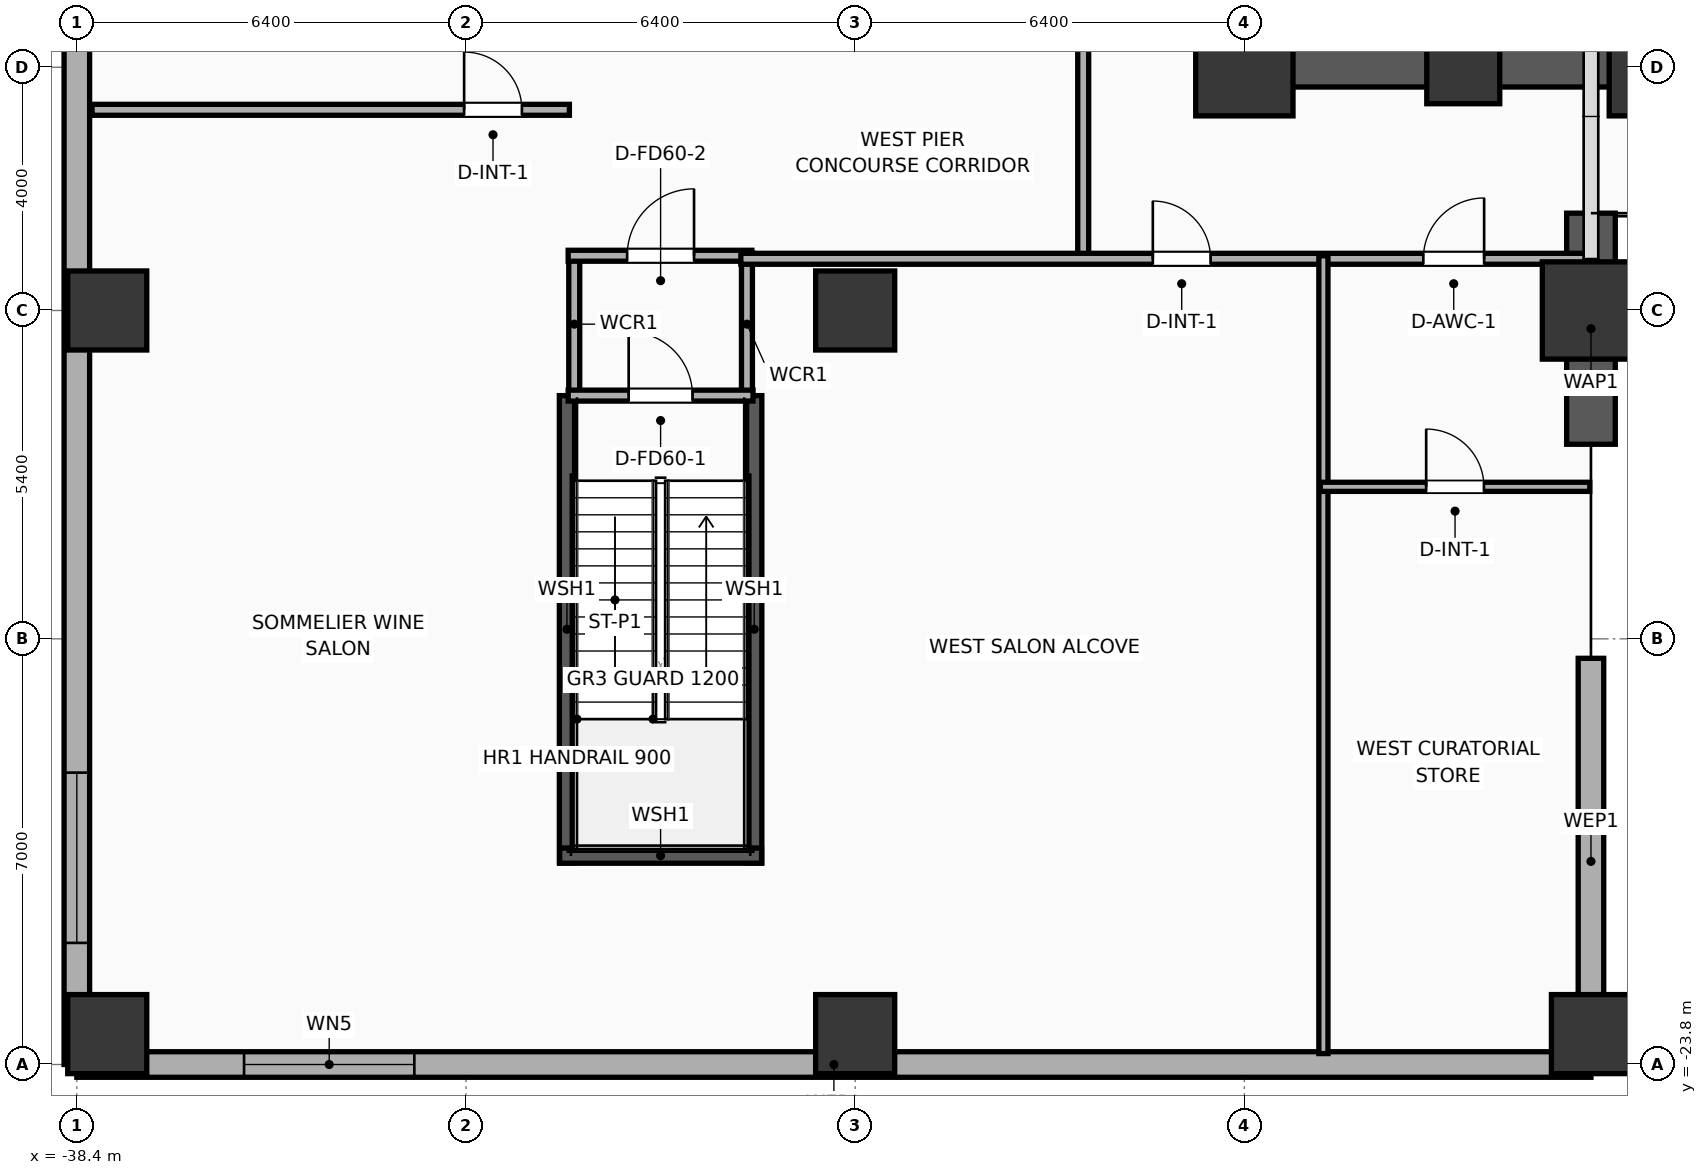
"""IFC4 building model, lengths in metres.
Left out: names, types, materials, properties, quantities, classifications, styles, units other than length and angle.
Written with IfcOpenShell. Run it as: python <this file> out.ifc"""

import sys

from ifc_helpers import new_model, si_unit, direction, frame, frame_2d, origin, origin_2d, place, context, subcontext, project, spatial, rectangle, extrude, element, fill, save


model = new_model("IFC4")
c1 = context("Model", 3, precision=1e-05, world=origin(), true_north=direction((0.0, 1.0)))
c2 = subcontext(c1, "Body", "Model", "MODEL_VIEW")
j1 = project(units=[si_unit("LENGTHUNIT", "METRE"), si_unit("PLANEANGLEUNIT", "RADIAN")], contexts=[c1])
p1 = place(None, origin())
s1 = spatial("IfcSite", under=j1, at=p1, CompositionType="ELEMENT")
p2 = place(p1, origin())
s2 = spatial("IfcBuilding", under=s1, at=p2, CompositionType="ELEMENT")
p3 = place(p2, frame((0.0, 0.0, 15.6)))
s3 = spatial("IfcBuildingStorey", under=s2, at=p3, CompositionType="ELEMENT", Elevation=15.6)
p4 = place(p3, frame((-19.2, -7.4, 0.0), z_axis=(0.0, 0.0, 1.0), x_axis=(1.0, 0.0, 0.0)))
e1 = element("IfcColumn", 1, at=p4, inside=s3, PredefinedType="COLUMN", context=c2, shape_type="SweptSolid", body=[
    extrude(rectangle(XDim=1.6, YDim=1.6, at=origin_2d()), origin(), (0.0, 0.0, 1.0), 5.2),
])
p5 = place(p3, frame((-15.6, -7.4, 0.0), z_axis=(0.0, 0.0, 1.0), x_axis=(1.0, 0.0, 0.0)))
e2 = element("IfcColumn", 2, at=p5, inside=s3, PredefinedType="COLUMN", context=c2, shape_type="SweptSolid", body=[
    extrude(rectangle(XDim=1.2, YDim=1.2, at=origin_2d()), origin(), (0.0, 0.0, 1.0), 5.2),
])
p6 = place(p3, frame((-12.4, -7.4, 0.0), z_axis=(0.0, 0.0, 1.0), x_axis=(1.0, 0.0, 0.0)))
e3 = element("IfcColumn", 3, at=p6, inside=s3, PredefinedType="COLUMN", context=c2, shape_type="SweptSolid", body=[
    extrude(rectangle(XDim=1.6, YDim=1.6, at=origin_2d()), origin(), (0.0, 0.0, 1.0), 5.2),
])
p7 = place(p3, frame((-19.525, -7.4, 0.0), z_axis=(0.0, 0.0, 1.0), x_axis=(1.0, 0.0, 0.0)))
e4 = element("IfcWall", 4, at=p7, inside=s3, PredefinedType="SHEAR", context=c2, shape_type="SweptSolid", body=[
    extrude(rectangle(XDim=7.45, YDim=0.65, at=frame_2d((3.725, 0.0))), origin(), (0.0, 0.0, 1.0), 4.8),
])
p8 = place(p3, frame((-19.145, -7.4, 0.0), z_axis=(0.0, 0.0, 1.0), x_axis=(0.0, 1.0, 0.0)))
e5 = element("IfcWall", 5, at=p8, inside=s3, PredefinedType="SHEAR", context=c2, shape_type="SweptSolid", body=[
    extrude(rectangle(XDim=14.8, YDim=0.65, at=frame_2d((7.4, 0.0))), origin(), (0.0, 0.0, 1.0), 4.8),
])
for number, where, z_axis, x_axis in (
    (6, (-30.34, -20.485, 0.0), (0.0, 0.0, 1.0), (0.0, 1.0, 0.0)),
    (7, (-27.26, -20.485, 0.0), (0.0, 0.0, 1.0), (0.0, 1.0, 0.0)),
):
    element("IfcWall", number, at=place(p3, frame(where, z_axis=z_axis, x_axis=x_axis)), inside=s3, PredefinedType="SOLIDWALL", context=c2, shape_type="SweptSolid", body=[
        extrude(rectangle(XDim=7.685, YDim=0.25, at=frame_2d((3.843, 0.0))), origin(), (0.0, 0.0, 1.0), 4.8),
    ])
p9 = place(p3, frame((-30.46, -20.365, 0.0), z_axis=(0.0, 0.0, 1.0), x_axis=(1.0, 0.0, 0.0)))
e8 = element("IfcWall", 8, at=p9, inside=s3, PredefinedType="SOLIDWALL", context=c2, shape_type="SweptSolid", body=[
    extrude(rectangle(XDim=3.32, YDim=0.25, at=frame_2d((1.66, 0.0))), origin(), (0.0, 0.0, 1.0), 4.8),
])
for number, where, z_axis, x_axis in (
    (9, (-37.9, -23.3, 0.0), (0.0, 0.0, 1.0), (1.0, 0.0, 0.0)),
    (10, (-37.9, -11.4, 0.0), (0.0, 0.0, 1.0), (1.0, 0.0, 0.0)),
    (11, (-25.6, -23.3, 0.0), (0.0, 0.0, 1.0), (1.0, 0.0, 0.0)),
    (12, (-25.6, -11.4, 0.0), (0.0, 0.0, 1.0), (1.0, 0.0, 0.0)),
    (13, (-13.5, -23.3, 0.0), (0.0, 0.0, 1.0), (1.0, 0.0, 0.0)),
):
    element("IfcColumn", number, at=place(p3, frame(where, z_axis=z_axis, x_axis=x_axis)), inside=s3, PredefinedType="COLUMN", context=c2, shape_type="SweptSolid", body=[
        extrude(rectangle(XDim=1.3, YDim=1.3, at=origin_2d()), origin(), (0.0, 0.0, 1.0), 5.2),
    ])
p10 = place(p3, frame((-13.5, -11.4, 0.0), z_axis=(0.0, 0.0, 1.0), x_axis=(1.0, 0.0, 0.0)))
e14 = element("IfcColumn", 14, at=p10, inside=s3, PredefinedType="COLUMN", context=c2, shape_type="SweptSolid", body=[
    extrude(rectangle(XDim=1.6, YDim=1.6, at=origin_2d()), origin(), (0.0, 0.0, 1.0), 5.2),
])
p11 = place(p3, frame((-13.5, -13.6, 0.0), z_axis=(0.0, 0.0, 1.0), x_axis=(0.0, 1.0, 0.0)))
e15 = element("IfcWall", 15, at=p11, inside=s3, PredefinedType="SOLIDWALL", context=c2, shape_type="SweptSolid", body=[
    extrude(rectangle(XDim=3.8, YDim=0.8, at=frame_2d((1.9, 0.0))), origin(), (0.0, 0.0, 1.0), 4.8),
])
p12 = place(p3, frame((-38.4, -23.8, 0.0), z_axis=(0.0, 0.0, 1.0), x_axis=(1.0, 0.0, 0.0)))
e16 = element("IfcWall", 16, at=p12, inside=s3, PredefinedType="ELEMENTEDWALL", context=c2, shape_type="SweptSolid", body=[
    extrude(rectangle(XDim=24.9, YDim=0.42, at=frame_2d((12.45, 0.0))), origin(), (0.0, 0.0, 1.0), 4.8),
])
p13 = place(p12, frame((2.75, 0.0, 0.65)))
e17 = element("IfcOpeningElement", 17, at=p13, cuts=e16, PredefinedType="OPENING", context=c2, shape_type="SweptSolid", body=[
    extrude(rectangle(XDim=2.8, YDim=2.6, at=frame_2d((1.4, 1.3))), frame((0.0, 0.22, 0.0), z_axis=(0.0, -1.0, 0.0), x_axis=(1.0, 0.0, 0.0)), (0.0, 0.0, 1.0), 0.44),
])
p14 = place(p3, frame((-13.5, -23.8, 0.0), z_axis=(0.0, 0.0, 1.0), x_axis=(0.0, 1.0, 0.0)))
e18 = element("IfcWall", 18, at=p14, inside=s3, PredefinedType="ELEMENTEDWALL", context=c2, shape_type="SweptSolid", body=[
    extrude(rectangle(XDim=6.68, YDim=0.42, at=frame_2d((3.34, 0.0))), origin(), (0.0, 0.0, 1.0), 4.09),
])
p15 = place(p3, frame((-38.4, 23.8, 0.0), z_axis=(0.0, 0.0, 1.0), x_axis=(0.0, -1.0, 0.0)))
e19 = element("IfcWall", 19, at=p15, inside=s3, PredefinedType="ELEMENTEDWALL", context=c2, shape_type="SweptSolid", body=[
    extrude(rectangle(XDim=47.6, YDim=0.42, at=frame_2d((23.8, 0.0))), origin(), (0.0, 0.0, 1.0), 4.8),
])
p16 = place(p15, frame((2.0, 0.0, 0.65)))
e20 = element("IfcOpeningElement", 20, at=p16, cuts=e19, PredefinedType="OPENING", context=c2, shape_type="SweptSolid", body=[
    extrude(rectangle(XDim=2.8, YDim=2.6, at=frame_2d((1.4, 1.3))), frame((0.0, 0.22, 0.0), z_axis=(0.0, -1.0, 0.0), x_axis=(1.0, 0.0, 0.0)), (0.0, 0.0, 1.0), 0.44),
])
p17 = place(p15, frame((15.6, 0.0, 0.65)))
e21 = element("IfcOpeningElement", 21, at=p17, cuts=e19, PredefinedType="OPENING", context=c2, shape_type="SweptSolid", body=[
    extrude(rectangle(XDim=2.8, YDim=2.6, at=frame_2d((1.4, 1.3))), frame((0.0, 0.22, 0.0), z_axis=(0.0, -1.0, 0.0), x_axis=(1.0, 0.0, 0.0)), (0.0, 0.0, 1.0), 0.44),
])
p18 = place(p15, frame((42.8, 0.0, 0.65)))
e22 = element("IfcOpeningElement", 22, at=p18, cuts=e19, PredefinedType="OPENING", context=c2, shape_type="SweptSolid", body=[
    extrude(rectangle(XDim=2.8, YDim=2.6, at=frame_2d((1.4, 1.3))), frame((0.0, 0.22, 0.0), z_axis=(0.0, -1.0, 0.0), x_axis=(1.0, 0.0, 0.0)), (0.0, 0.0, 1.0), 0.44),
])
p19 = place(p3, frame((-15.4, -4.8, 0.0), z_axis=(0.0, 0.0, 1.0), x_axis=(0.0, -1.0, 0.0)))
e23 = element("IfcWall", 23, at=p19, inside=s3, PredefinedType="SOLIDWALL", context=c2, shape_type="SweptSolid", body=[
    extrude(rectangle(XDim=2.6, YDim=0.25, at=frame_2d((1.3, 0.0))), origin(), (0.0, 0.0, 1.0), 4.8),
])
for number, where, z_axis, x_axis in (
    (24, (-30.22, -12.8, 0.0), (0.0, 0.0, 1.0), (0.0, 1.0, 0.0)),
    (25, (-27.38, -12.8, 0.0), (0.0, 0.0, 1.0), (0.0, 1.0, 0.0)),
):
    element("IfcWall", number, at=place(p3, frame(where, z_axis=z_axis, x_axis=x_axis)), inside=s3, PredefinedType="PARTITIONING", context=c2, shape_type="SweptSolid", body=[
        extrude(rectangle(XDim=2.35, YDim=0.18, at=frame_2d((1.175, 0.0))), origin(), (0.0, 0.0, 1.0), 4.8),
    ])
p20 = place(p3, frame((-30.32, -12.8, 0.0), z_axis=(0.0, 0.0, 1.0), x_axis=(1.0, 0.0, 0.0)))
e26 = element("IfcWall", 26, at=p20, inside=s3, PredefinedType="PARTITIONING", context=c2, shape_type="SweptSolid", body=[
    extrude(rectangle(XDim=3.04, YDim=0.18, at=frame_2d((1.52, 0.0))), origin(), (0.0, 0.0, 1.0), 4.8),
])
p21 = place(p20, frame((0.995, 0.0, 0.0)))
e27 = element("IfcOpeningElement", 27, at=p21, cuts=e26, PredefinedType="OPENING", context=c2, shape_type="SweptSolid", body=[
    extrude(rectangle(XDim=1.05, YDim=2.05, at=frame_2d((0.525, 1.025))), frame((0.0, 0.1, 0.0), z_axis=(0.0, -1.0, 0.0), x_axis=(1.0, 0.0, 0.0)), (0.0, 0.0, 1.0), 0.2),
])
p22 = place(p3, frame((-30.32, -10.5, 0.0), z_axis=(0.0, 0.0, 1.0), x_axis=(1.0, 0.0, 0.0)))
e28 = element("IfcWall", 28, at=p22, inside=s3, PredefinedType="PARTITIONING", context=c2, shape_type="SweptSolid", body=[
    extrude(rectangle(XDim=3.02, YDim=0.18, at=frame_2d((1.51, 0.0))), origin(), (0.0, 0.0, 1.0), 4.8),
])
p23 = place(p22, frame((0.97, 0.0, 0.0)))
e29 = element("IfcOpeningElement", 29, at=p23, cuts=e28, PredefinedType="OPENING", context=c2, shape_type="SweptSolid", body=[
    extrude(rectangle(XDim=1.1, YDim=2.05, at=frame_2d((0.55, 1.025))), frame((0.0, 0.1, 0.0), z_axis=(0.0, -1.0, 0.0), x_axis=(1.0, 0.0, 0.0)), (0.0, 0.0, 1.0), 0.2),
])
p24 = place(p3, frame((-38.15, -8.1, 0.0), z_axis=(0.0, 0.0, 1.0), x_axis=(1.0, 0.0, 0.0)))
e30 = element("IfcWall", 30, at=p24, inside=s3, PredefinedType="PARTITIONING", context=c2, shape_type="SweptSolid", body=[
    extrude(rectangle(XDim=7.85, YDim=0.18, at=frame_2d((3.925, 0.0))), origin(), (0.0, 0.0, 1.0), 4.8),
])
p25 = place(p24, frame((6.119, 0.0, 0.0)))
e31 = element("IfcOpeningElement", 31, at=p25, cuts=e30, PredefinedType="OPENING", context=c2, shape_type="SweptSolid", body=[
    extrude(rectangle(XDim=0.95, YDim=2.05, at=frame_2d((0.475, 1.025))), frame((0.0, 0.1, 0.0), z_axis=(0.0, -1.0, 0.0), x_axis=(1.0, 0.0, 0.0)), (0.0, 0.0, 1.0), 0.2),
])
p26 = place(p3, frame((-21.85, -10.5, 0.0), z_axis=(0.0, 0.0, 1.0), x_axis=(0.0, 1.0, 0.0)))
e32 = element("IfcWall", 32, at=p26, inside=s3, PredefinedType="PARTITIONING", context=c2, shape_type="SweptSolid", body=[
    extrude(rectangle(XDim=34.12, YDim=0.18, at=frame_2d((17.06, 0.0))), origin(), (0.0, 0.0, 1.0), 4.8),
])
p27 = place(p26, frame((13.531, 0.0, 0.0)))
e33 = element("IfcOpeningElement", 33, at=p27, cuts=e32, PredefinedType="OPENING", context=c2, shape_type="SweptSolid", body=[
    extrude(rectangle(XDim=1.6, YDim=2.05, at=frame_2d((0.8, 1.025))), frame((0.0, 0.1, 0.0), z_axis=(0.0, -1.0, 0.0), x_axis=(1.0, 0.0, 0.0)), (0.0, 0.0, 1.0), 0.2),
])
p28 = place(p3, frame((-27.48, -10.55, 0.0), z_axis=(0.0, 0.0, 1.0), x_axis=(1.0, 0.0, 0.0)))
e34 = element("IfcWall", 34, at=p28, inside=s3, PredefinedType="PARTITIONING", context=c2, shape_type="SweptSolid", body=[
    extrude(rectangle(XDim=13.96, YDim=0.18, at=frame_2d((6.98, 0.0))), origin(), (0.0, 0.0, 1.0), 4.8),
])
p29 = place(p28, frame((6.775, 0.0, 0.0)))
e35 = element("IfcOpeningElement", 35, at=p29, cuts=e34, PredefinedType="OPENING", context=c2, shape_type="SweptSolid", body=[
    extrude(rectangle(XDim=0.95, YDim=2.05, at=frame_2d((0.475, 1.025))), frame((0.0, 0.1, 0.0), z_axis=(0.0, -1.0, 0.0), x_axis=(1.0, 0.0, 0.0)), (0.0, 0.0, 1.0), 0.2),
])
p30 = place(p28, frame((11.223, 0.0, 0.0)))
e36 = element("IfcOpeningElement", 36, at=p30, cuts=e34, PredefinedType="OPENING", context=c2, shape_type="SweptSolid", body=[
    extrude(rectangle(XDim=1.0, YDim=2.05, at=frame_2d((0.5, 1.025))), frame((0.0, 0.1, 0.0), z_axis=(0.0, -1.0, 0.0), x_axis=(1.0, 0.0, 0.0)), (0.0, 0.0, 1.0), 0.2),
])
p31 = place(p3, frame((-17.9, -23.62, 0.0), z_axis=(0.0, 0.0, 1.0), x_axis=(0.0, 1.0, 0.0)))
e37 = element("IfcWall", 37, at=p31, inside=s3, PredefinedType="PLUMBINGWALL", context=c2, shape_type="SweptSolid", body=[
    extrude(rectangle(XDim=13.12, YDim=0.15, at=frame_2d((6.56, 0.0))), origin(), (0.0, 0.0, 1.0), 4.8),
])
p32 = place(p3, frame((-17.95, -14.3, 0.0), z_axis=(0.0, 0.0, 1.0), x_axis=(1.0, 0.0, 0.0)))
e38 = element("IfcWall", 38, at=p32, inside=s3, PredefinedType="PLUMBINGWALL", context=c2, shape_type="SweptSolid", body=[
    extrude(rectangle(XDim=4.43, YDim=0.15, at=frame_2d((2.215, 0.0))), origin(), (0.0, 0.0, 1.0), 4.8),
])
p33 = place(p32, frame((1.74, 0.0, 0.0)))
e39 = element("IfcOpeningElement", 39, at=p33, cuts=e38, PredefinedType="OPENING", context=c2, shape_type="SweptSolid", body=[
    extrude(rectangle(XDim=0.95, YDim=2.05, at=frame_2d((0.475, 1.025))), frame((0.0, 0.085, 0.0), z_axis=(0.0, -1.0, 0.0), x_axis=(1.0, 0.0, 0.0)), (0.0, 0.0, 1.0), 0.17),
])
p34 = place(p13, origin())
e40 = element("IfcWindow", 40, at=p34, inside=s3, PartitioningType="SINGLE_PANEL", PredefinedType="WINDOW", context=c2, shape_type="SweptSolid", body=[
    extrude(rectangle(XDim=2.8, YDim=2.6, at=frame_2d((1.4, 1.3))), frame((0.0, 0.03, 0.0), z_axis=(0.0, -1.0, 0.0), x_axis=(1.0, 0.0, 0.0)), (0.0, 0.0, 1.0), 0.06),
])
fill(e17, e40)
p35 = place(p18, origin())
e41 = element("IfcWindow", 41, at=p35, inside=s3, PartitioningType="SINGLE_PANEL", PredefinedType="WINDOW", context=c2, shape_type="SweptSolid", body=[
    extrude(rectangle(XDim=2.8, YDim=2.6, at=frame_2d((1.4, 1.3))), frame((0.0, 0.03, 0.0), z_axis=(0.0, -1.0, 0.0), x_axis=(1.0, 0.0, 0.0)), (0.0, 0.0, 1.0), 0.06),
])
fill(e22, e41)
p36 = place(p21, origin())
e42 = element("IfcDoor", 42, at=p36, inside=s3, OperationType="SINGLE_SWING_LEFT", PredefinedType="DOOR", context=c2, shape_type="SweptSolid", body=[
    extrude(rectangle(XDim=1.05, YDim=2.05, at=frame_2d((0.525, 1.025))), frame((0.0, 0.025, 0.0), z_axis=(0.0, -1.0, 0.0), x_axis=(1.0, 0.0, 0.0)), (0.0, 0.0, 1.0), 0.05),
])
fill(e27, e42)
p37 = place(p23, origin())
e43 = element("IfcDoor", 43, at=p37, inside=s3, OperationType="SINGLE_SWING_RIGHT", PredefinedType="DOOR", context=c2, shape_type="SweptSolid", body=[
    extrude(rectangle(XDim=1.1, YDim=2.05, at=frame_2d((0.55, 1.025))), frame((0.0, 0.025, 0.0), z_axis=(0.0, -1.0, 0.0), x_axis=(1.0, 0.0, 0.0)), (0.0, 0.0, 1.0), 0.05),
])
fill(e29, e43)
p38 = place(p25, origin())
e44 = element("IfcDoor", 44, at=p38, inside=s3, OperationType="SINGLE_SWING_LEFT", PredefinedType="DOOR", context=c2, shape_type="SweptSolid", body=[
    extrude(rectangle(XDim=0.95, YDim=2.05, at=frame_2d((0.475, 1.025))), frame((0.0, 0.025, 0.0), z_axis=(0.0, -1.0, 0.0), x_axis=(1.0, 0.0, 0.0)), (0.0, 0.0, 1.0), 0.05),
])
fill(e31, e44)
p39 = place(p29, origin())
e45 = element("IfcDoor", 45, at=p39, inside=s3, OperationType="SINGLE_SWING_LEFT", PredefinedType="DOOR", context=c2, shape_type="SweptSolid", body=[
    extrude(rectangle(XDim=0.95, YDim=2.05, at=frame_2d((0.475, 1.025))), frame((0.0, 0.025, 0.0), z_axis=(0.0, -1.0, 0.0), x_axis=(1.0, 0.0, 0.0)), (0.0, 0.0, 1.0), 0.05),
])
fill(e35, e45)
p40 = place(p30, origin())
e46 = element("IfcDoor", 46, at=p40, inside=s3, OperationType="SINGLE_SWING_RIGHT", PredefinedType="DOOR", context=c2, shape_type="SweptSolid", body=[
    extrude(rectangle(XDim=1.0, YDim=2.05, at=frame_2d((0.5, 1.025))), frame((0.0, 0.025, 0.0), z_axis=(0.0, -1.0, 0.0), x_axis=(1.0, 0.0, 0.0)), (0.0, 0.0, 1.0), 0.05),
])
fill(e36, e46)
p41 = place(p33, origin())
e47 = element("IfcDoor", 47, at=p41, inside=s3, OperationType="SINGLE_SWING_LEFT", PredefinedType="DOOR", context=c2, shape_type="SweptSolid", body=[
    extrude(rectangle(XDim=0.95, YDim=2.05, at=frame_2d((0.475, 1.025))), frame((0.0, 0.025, 0.0), z_axis=(0.0, -1.0, 0.0), x_axis=(1.0, 0.0, 0.0)), (0.0, 0.0, 1.0), 0.05),
])
fill(e39, e47)
save(model, sys.argv[1])
